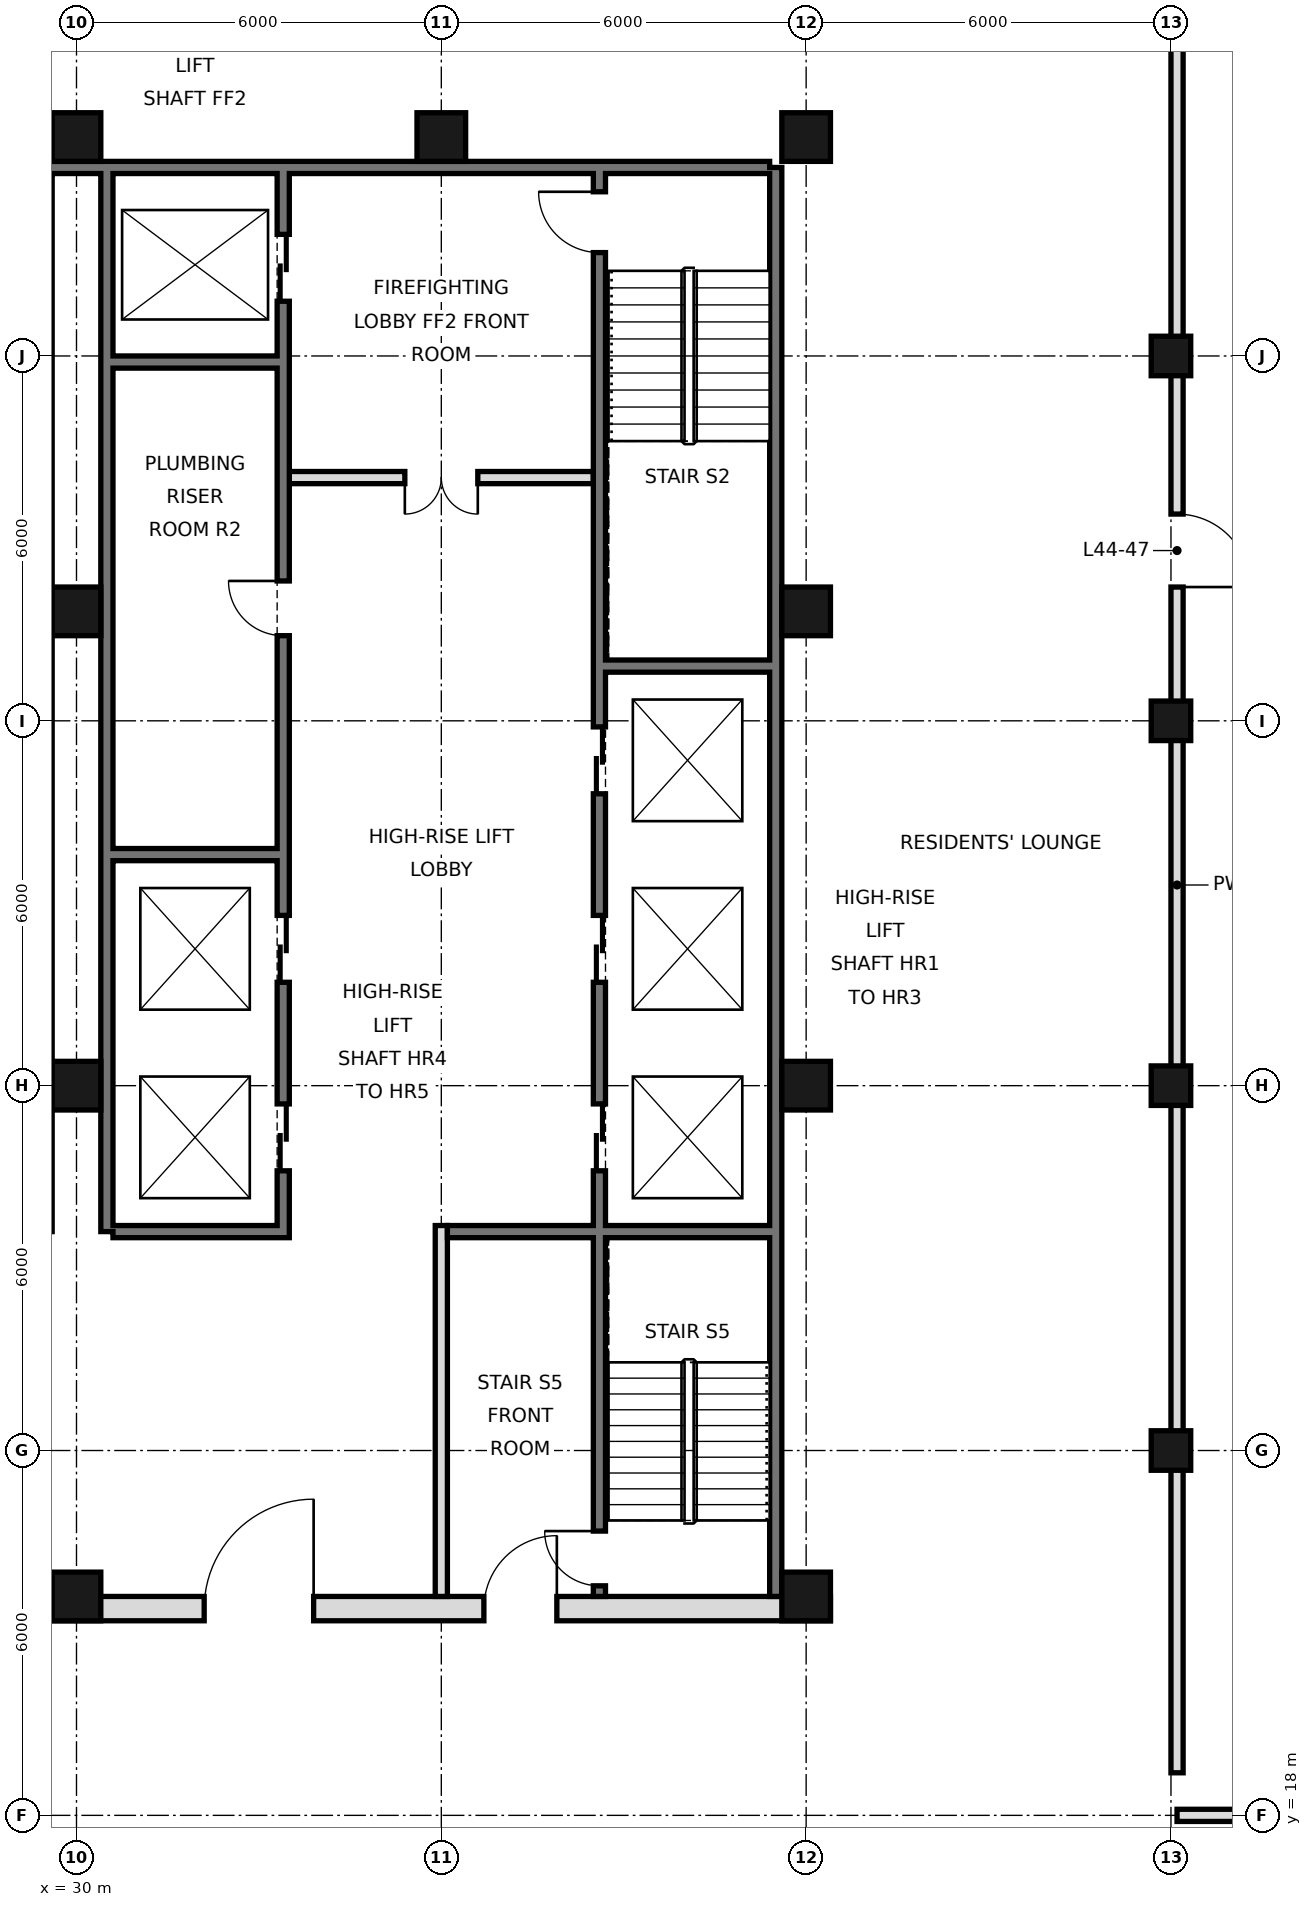
"""IFC4 building model, lengths in metres.
Left out: names, types, materials, properties, quantities, classifications, styles, units other than length and angle.
Written with IfcOpenShell. Run it as: python <this file> out.ifc"""

import sys

from ifc_helpers import new_model, si_unit, direction, frame, frame_2d, origin, origin_2d, place, context, subcontext, project, spatial, rectangle, hollow_rectangle, extrude, element, fill, save


model = new_model("IFC4")
c1 = context("Model", 3, precision=1e-05, world=origin(), true_north=direction((0.0, 1.0)))
c2 = subcontext(c1, "Body", "Model", "MODEL_VIEW")
j1 = project(units=[si_unit("LENGTHUNIT", "METRE"), si_unit("PLANEANGLEUNIT", "RADIAN")], contexts=[c1])
p1 = place(None, origin())
s1 = spatial("IfcSite", under=j1, at=p1, CompositionType="ELEMENT")
p2 = place(p1, origin())
s2 = spatial("IfcBuilding", under=s1, at=p2, CompositionType="ELEMENT")
p3 = place(p2, frame((0.0, 0.0, 192.0)))
s3 = spatial("IfcBuildingStorey", under=s2, at=p3, CompositionType="ELEMENT", Elevation=192.0)
for number, where, z_axis, x_axis in (
    (1, (30.0, 21.6, 0.0), (0.0, 0.0, 1.0), (1.0, 0.0, 0.0)),
    (2, (30.0, 30.0, 0.0), (0.0, 0.0, 1.0), (1.0, 0.0, 0.0)),
    (3, (30.0, 37.8, 0.0), (0.0, 0.0, 1.0), (1.0, 0.0, 0.0)),
    (4, (30.0, 45.6, 0.0), (0.0, 0.0, 1.0), (1.0, 0.0, 0.0)),
    (5, (36.0, 45.6, 0.0), (0.0, 0.0, 1.0), (1.0, 0.0, 0.0)),
    (6, (42.0, 21.6, 0.0), (0.0, 0.0, 1.0), (1.0, 0.0, 0.0)),
    (7, (42.0, 30.0, 0.0), (0.0, 0.0, 1.0), (1.0, 0.0, 0.0)),
    (8, (42.0, 37.8, 0.0), (0.0, 0.0, 1.0), (1.0, 0.0, 0.0)),
    (9, (42.0, 45.6, 0.0), (0.0, 0.0, 1.0), (1.0, 0.0, 0.0)),
):
    element("IfcColumn", number, at=place(p3, frame(where, z_axis=z_axis, x_axis=x_axis)), inside=s3, PredefinedType="COLUMN", context=c2, shape_type="SweptSolid", body=[
        extrude(hollow_rectangle(XDim=0.8, YDim=0.8, WallThickness=0.045, at=origin_2d()), origin(), (0.0, 0.0, 1.0), 3.6),
    ])
for number, where, z_axis, x_axis in (
    (10, (48.0, 24.0, 0.0), (0.0, 0.0, 1.0), (1.0, 0.0, 0.0)),
    (11, (48.0, 30.0, 0.0), (0.0, 0.0, 1.0), (1.0, 0.0, 0.0)),
    (12, (48.0, 36.0, 0.0), (0.0, 0.0, 1.0), (1.0, 0.0, 0.0)),
    (13, (48.0, 42.0, 0.0), (0.0, 0.0, 1.0), (1.0, 0.0, 0.0)),
):
    element("IfcColumn", number, at=place(p3, frame(where, z_axis=z_axis, x_axis=x_axis)), inside=s3, PredefinedType="COLUMN", context=c2, shape_type="SweptSolid", body=[
        extrude(hollow_rectangle(XDim=0.65, YDim=0.65, WallThickness=0.032, at=origin_2d()), origin(), (0.0, 0.0, 1.0), 3.6),
    ])
p4 = place(p3, frame((48.1, 18.7, 0.0), z_axis=(0.0, 0.0, 1.0), x_axis=(0.0, 1.0, 0.0)))
e14 = element("IfcWall", 14, at=p4, inside=s3, PredefinedType="SOLIDWALL", context=c2, shape_type="SweptSolid", body=[
    extrude(rectangle(XDim=29.2, YDim=0.2, at=frame_2d((14.6, 0.0))), origin(), (0.0, 0.0, 1.0), 2.72),
])
p5 = place(p4, frame((19.5, 0.0, 0.0)))
e15 = element("IfcOpeningElement", 15, at=p5, cuts=e14, PredefinedType="OPENING", context=c2, shape_type="SweptSolid", body=[
    extrude(rectangle(XDim=1.2, YDim=2.4, at=frame_2d((0.6, 1.2))), frame((0.0, 0.11, 0.0), z_axis=(0.0, -1.0, 0.0), x_axis=(1.0, 0.0, 0.0)), (0.0, 0.0, 1.0), 0.22),
])
p6 = place(p3, frame((48.1, 18.0, 0.0), z_axis=(0.0, 0.0, 1.0), x_axis=(1.0, 0.0, 0.0)))
e16 = element("IfcWall", 16, at=p6, inside=s3, PredefinedType="SOLIDWALL", context=c2, shape_type="SweptSolid", body=[
    extrude(rectangle(XDim=6.5, YDim=0.2, at=frame_2d((3.25, 0.0))), origin(), (0.0, 0.0, 1.0), 2.72),
])
p7 = place(p3, frame((41.5, 21.6, 0.0), z_axis=(0.0, 0.0, 1.0), x_axis=(0.0, 1.0, 0.0)))
e17 = element("IfcWall", 17, at=p7, inside=s3, PredefinedType="SOLIDWALL", context=c2, shape_type="SweptSolid", body=[
    extrude(rectangle(XDim=23.5, YDim=0.2, at=frame_2d((11.75, 0.0))), origin(), (0.0, 0.0, 1.0), 3.42),
])
p8 = place(p3, frame((6.6, 45.1, 0.0), z_axis=(0.0, 0.0, 1.0), x_axis=(1.0, 0.0, 0.0)))
e18 = element("IfcWall", 18, at=p8, inside=s3, PredefinedType="SOLIDWALL", context=c2, shape_type="SweptSolid", body=[
    extrude(rectangle(XDim=34.8, YDim=0.2, at=frame_2d((17.4, 0.0))), origin(), (0.0, 0.0, 1.0), 3.42),
])
p9 = place(p3, frame((30.5, 27.6, 0.0), z_axis=(0.0, 0.0, 1.0), x_axis=(0.0, 1.0, 0.0)))
e19 = element("IfcWall", 19, at=p9, inside=s3, PredefinedType="SOLIDWALL", context=c2, shape_type="SweptSolid", body=[
    extrude(rectangle(XDim=17.5, YDim=0.2, at=frame_2d((8.75, 0.0))), origin(), (0.0, 0.0, 1.0), 3.42),
])
p10 = place(p3, frame((5.6, 21.4, 0.0), z_axis=(0.0, 0.0, 1.0), x_axis=(1.0, 0.0, 0.0)))
e20 = element("IfcWall", 20, at=p10, inside=s3, PredefinedType="SOLIDWALL", context=c2, shape_type="SweptSolid", body=[
    extrude(rectangle(XDim=36.8, YDim=0.4, at=frame_2d((18.4, 0.0))), origin(), (0.0, 0.0, 1.0), 3.42),
])
p11 = place(p10, frame((8.5, 0.0, 0.0)))
e21 = element("IfcOpeningElement", 21, at=p11, cuts=e20, PredefinedType="OPENING", context=c2, shape_type="SweptSolid", body=[
    extrude(rectangle(XDim=1.8, YDim=2.1, at=frame_2d((0.9, 1.05))), frame((0.0, 0.21, 0.0), z_axis=(0.0, -1.0, 0.0), x_axis=(1.0, 0.0, 0.0)), (0.0, 0.0, 1.0), 0.42),
])
p12 = place(p10, frame((17.5, 0.0, 0.0)))
e22 = element("IfcOpeningElement", 22, at=p12, cuts=e20, PredefinedType="OPENING", context=c2, shape_type="SweptSolid", body=[
    extrude(rectangle(XDim=1.8, YDim=2.1, at=frame_2d((0.9, 1.05))), frame((0.0, 0.21, 0.0), z_axis=(0.0, -1.0, 0.0), x_axis=(1.0, 0.0, 0.0)), (0.0, 0.0, 1.0), 0.42),
])
p13 = place(p10, frame((26.5, 0.0, 0.0)))
e23 = element("IfcOpeningElement", 23, at=p13, cuts=e20, PredefinedType="OPENING", context=c2, shape_type="SweptSolid", body=[
    extrude(rectangle(XDim=1.8, YDim=2.1, at=frame_2d((0.9, 1.05))), frame((0.0, 0.21, 0.0), z_axis=(0.0, -1.0, 0.0), x_axis=(1.0, 0.0, 0.0)), (0.0, 0.0, 1.0), 0.42),
])
p14 = place(p10, frame((4.5, 0.0, 0.0)))
e24 = element("IfcOpeningElement", 24, at=p14, cuts=e20, PredefinedType="OPENING", context=c2, shape_type="SweptSolid", body=[
    extrude(rectangle(XDim=1.2, YDim=2.1, at=frame_2d((0.6, 1.05))), frame((0.0, 0.21, 0.0), z_axis=(0.0, -1.0, 0.0), x_axis=(1.0, 0.0, 0.0)), (0.0, 0.0, 1.0), 0.42),
])
p15 = place(p10, frame((31.1, 0.0, 0.0)))
e25 = element("IfcOpeningElement", 25, at=p15, cuts=e20, PredefinedType="OPENING", context=c2, shape_type="SweptSolid", body=[
    extrude(rectangle(XDim=1.2, YDim=2.1, at=frame_2d((0.6, 1.05))), frame((0.0, 0.21, 0.0), z_axis=(0.0, -1.0, 0.0), x_axis=(1.0, 0.0, 0.0)), (0.0, 0.0, 1.0), 0.42),
])
p16 = place(p3, frame((33.4, 27.5, 0.0), z_axis=(0.0, 0.0, 1.0), x_axis=(0.0, 1.0, 0.0)))
e26 = element("IfcWall", 26, at=p16, inside=s3, PredefinedType="SOLIDWALL", context=c2, shape_type="SweptSolid", body=[
    extrude(rectangle(XDim=17.5, YDim=0.2, at=frame_2d((8.75, 0.0))), origin(), (0.0, 0.0, 1.0), 3.42),
])
p17 = place(p16, frame((1.1, 0.0, 0.0)))
e27 = element("IfcOpeningElement", 27, at=p17, cuts=e26, PredefinedType="OPENING", context=c2, shape_type="SweptSolid", body=[
    extrude(rectangle(XDim=1.1, YDim=2.1, at=frame_2d((0.55, 1.05))), frame((0.0, 0.11, 0.0), z_axis=(0.0, -1.0, 0.0), x_axis=(1.0, 0.0, 0.0)), (0.0, 0.0, 1.0), 0.22),
])
p18 = place(p16, frame((4.2, 0.0, 0.0)))
e28 = element("IfcOpeningElement", 28, at=p18, cuts=e26, PredefinedType="OPENING", context=c2, shape_type="SweptSolid", body=[
    extrude(rectangle(XDim=1.1, YDim=2.1, at=frame_2d((0.55, 1.05))), frame((0.0, 0.11, 0.0), z_axis=(0.0, -1.0, 0.0), x_axis=(1.0, 0.0, 0.0)), (0.0, 0.0, 1.0), 0.22),
])
p19 = place(p16, frame((15.4, 0.0, 0.0)))
e29 = element("IfcOpeningElement", 29, at=p19, cuts=e26, PredefinedType="OPENING", context=c2, shape_type="SweptSolid", body=[
    extrude(rectangle(XDim=1.1, YDim=2.1, at=frame_2d((0.55, 1.05))), frame((0.0, 0.11, 0.0), z_axis=(0.0, -1.0, 0.0), x_axis=(1.0, 0.0, 0.0)), (0.0, 0.0, 1.0), 0.22),
])
p20 = place(p16, frame((9.9, 0.0, 0.0)))
e30 = element("IfcOpeningElement", 30, at=p20, cuts=e26, PredefinedType="OPENING", context=c2, shape_type="SweptSolid", body=[
    extrude(rectangle(XDim=0.9, YDim=2.1, at=frame_2d((0.45, 1.05))), frame((0.0, 0.11, 0.0), z_axis=(0.0, -1.0, 0.0), x_axis=(1.0, 0.0, 0.0)), (0.0, 0.0, 1.0), 0.22),
])
p21 = place(p3, frame((36.0, 21.6, 0.0), z_axis=(0.0, 0.0, 1.0), x_axis=(0.0, 1.0, 0.0)))
e31 = element("IfcWall", 31, at=p21, inside=s3, PredefinedType="PARTITIONING", context=c2, shape_type="SweptSolid", body=[
    extrude(rectangle(XDim=6.1, YDim=0.2, at=frame_2d((3.05, 0.0))), origin(), (0.0, 0.0, 1.0), 3.42),
])
p22 = place(p3, frame((38.6, 21.6, 0.0), z_axis=(0.0, 0.0, 1.0), x_axis=(0.0, 1.0, 0.0)))
e32 = element("IfcWall", 32, at=p22, inside=s3, PredefinedType="SOLIDWALL", context=c2, shape_type="SweptSolid", body=[
    extrude(rectangle(XDim=23.4, YDim=0.2, at=frame_2d((11.7, 0.0))), origin(), (0.0, 0.0, 1.0), 3.42),
])
p23 = place(p22, frame((7.0, 0.0, 0.0)))
e33 = element("IfcOpeningElement", 33, at=p23, cuts=e32, PredefinedType="OPENING", context=c2, shape_type="SweptSolid", body=[
    extrude(rectangle(XDim=1.1, YDim=2.1, at=frame_2d((0.55, 1.05))), frame((0.0, 0.11, 0.0), z_axis=(0.0, -1.0, 0.0), x_axis=(1.0, 0.0, 0.0)), (0.0, 0.0, 1.0), 0.22),
])
p24 = place(p22, frame((10.1, 0.0, 0.0)))
e34 = element("IfcOpeningElement", 34, at=p24, cuts=e32, PredefinedType="OPENING", context=c2, shape_type="SweptSolid", body=[
    extrude(rectangle(XDim=1.1, YDim=2.1, at=frame_2d((0.55, 1.05))), frame((0.0, 0.11, 0.0), z_axis=(0.0, -1.0, 0.0), x_axis=(1.0, 0.0, 0.0)), (0.0, 0.0, 1.0), 0.22),
])
p25 = place(p22, frame((13.2, 0.0, 0.0)))
e35 = element("IfcOpeningElement", 35, at=p25, cuts=e32, PredefinedType="OPENING", context=c2, shape_type="SweptSolid", body=[
    extrude(rectangle(XDim=1.1, YDim=2.1, at=frame_2d((0.55, 1.05))), frame((0.0, 0.11, 0.0), z_axis=(0.0, -1.0, 0.0), x_axis=(1.0, 0.0, 0.0)), (0.0, 0.0, 1.0), 0.22),
])
p26 = place(p22, frame((22.1, 0.0, 0.0)))
e36 = element("IfcOpeningElement", 36, at=p26, cuts=e32, PredefinedType="OPENING", context=c2, shape_type="SweptSolid", body=[
    extrude(rectangle(XDim=1.0, YDim=2.1, at=frame_2d((0.5, 1.05))), frame((0.0, 0.11, 0.0), z_axis=(0.0, -1.0, 0.0), x_axis=(1.0, 0.0, 0.0)), (0.0, 0.0, 1.0), 0.22),
])
p27 = place(p22, frame((0.175, 0.0, 0.0)))
e37 = element("IfcOpeningElement", 37, at=p27, cuts=e32, PredefinedType="OPENING", context=c2, shape_type="SweptSolid", body=[
    extrude(rectangle(XDim=0.9, YDim=2.1, at=frame_2d((0.45, 1.05))), frame((0.0, 0.11, 0.0), z_axis=(0.0, -1.0, 0.0), x_axis=(1.0, 0.0, 0.0)), (0.0, 0.0, 1.0), 0.22),
])
p28 = place(p3, frame((30.6, 27.6, 0.0), z_axis=(0.0, 0.0, 1.0), x_axis=(1.0, 0.0, 0.0)))
e38 = element("IfcWall", 38, at=p28, inside=s3, PredefinedType="SOLIDWALL", context=c2, shape_type="SweptSolid", body=[
    extrude(rectangle(XDim=2.7, YDim=0.2, at=frame_2d((1.35, 0.0))), origin(), (0.0, 0.0, 1.0), 3.42),
])
p29 = place(p3, frame((36.1, 27.6, 0.0), z_axis=(0.0, 0.0, 1.0), x_axis=(1.0, 0.0, 0.0)))
e39 = element("IfcWall", 39, at=p29, inside=s3, PredefinedType="SOLIDWALL", context=c2, shape_type="SweptSolid", body=[
    extrude(rectangle(XDim=5.3, YDim=0.2, at=frame_2d((2.65, 0.0))), origin(), (0.0, 0.0, 1.0), 3.42),
])
for number, where, z_axis, x_axis in (
    (40, (30.6, 33.8, 0.0), (0.0, 0.0, 1.0), (1.0, 0.0, 0.0)),
    (41, (38.7, 36.9, 0.0), (0.0, 0.0, 1.0), (1.0, 0.0, 0.0)),
):
    element("IfcWall", number, at=place(p3, frame(where, z_axis=z_axis, x_axis=x_axis)), inside=s3, PredefinedType="SOLIDWALL", context=c2, shape_type="SweptSolid", body=[
        extrude(rectangle(XDim=2.7, YDim=0.2, at=frame_2d((1.35, 0.0))), origin(), (0.0, 0.0, 1.0), 3.42),
    ])
p30 = place(p3, frame((33.5, 40.0, 0.0), z_axis=(0.0, 0.0, 1.0), x_axis=(1.0, 0.0, 0.0)))
e42 = element("IfcWall", 42, at=p30, inside=s3, PredefinedType="PARTITIONING", context=c2, shape_type="SweptSolid", body=[
    extrude(rectangle(XDim=5.0, YDim=0.2, at=frame_2d((2.5, 0.0))), origin(), (0.0, 0.0, 1.0), 3.42),
])
p31 = place(p30, frame((1.9, 0.0, 0.0)))
e43 = element("IfcOpeningElement", 43, at=p31, cuts=e42, PredefinedType="OPENING", context=c2, shape_type="SweptSolid", body=[
    extrude(rectangle(XDim=1.2, YDim=2.1, at=frame_2d((0.6, 1.05))), frame((0.0, 0.11, 0.0), z_axis=(0.0, -1.0, 0.0), x_axis=(1.0, 0.0, 0.0)), (0.0, 0.0, 1.0), 0.22),
])
p32 = place(p3, frame((30.6, 41.9, 0.0), z_axis=(0.0, 0.0, 1.0), x_axis=(1.0, 0.0, 0.0)))
e44 = element("IfcWall", 44, at=p32, inside=s3, PredefinedType="SOLIDWALL", context=c2, shape_type="SweptSolid", body=[
    extrude(rectangle(XDim=2.7, YDim=0.2, at=frame_2d((1.35, 0.0))), origin(), (0.0, 0.0, 1.0), 3.42),
])
p33 = place(p5, frame((1.2, 0.0, 0.0), z_axis=(0.0, 0.0, 1.0), x_axis=(-1.0, 0.0, 0.0)))
e45 = element("IfcDoor", 45, at=p33, inside=s3, OperationType="SINGLE_SWING_RIGHT", PredefinedType="DOOR", context=c2, shape_type="SweptSolid", body=[
    extrude(rectangle(XDim=1.2, YDim=2.4, at=frame_2d((0.6, 1.2))), frame((0.0, 0.025, 0.0), z_axis=(0.0, -1.0, 0.0), x_axis=(1.0, 0.0, 0.0)), (0.0, 0.0, 1.0), 0.05),
])
fill(e15, e45)
p34 = place(p13, frame((1.8, 0.0, 0.0), z_axis=(0.0, 0.0, 1.0), x_axis=(-1.0, 0.0, 0.0)))
e46 = element("IfcDoor", 46, at=p34, inside=s3, OperationType="SINGLE_SWING_LEFT", PredefinedType="DOOR", context=c2, shape_type="SweptSolid", body=[
    extrude(rectangle(XDim=1.8, YDim=2.1, at=frame_2d((0.9, 1.05))), frame((0.0, 0.025, 0.0), z_axis=(0.0, -1.0, 0.0), x_axis=(1.0, 0.0, 0.0)), (0.0, 0.0, 1.0), 0.05),
])
fill(e23, e46)
p35 = place(p15, frame((1.2, 0.0, 0.0), z_axis=(0.0, 0.0, 1.0), x_axis=(-1.0, 0.0, 0.0)))
e47 = element("IfcDoor", 47, at=p35, inside=s3, OperationType="SINGLE_SWING_LEFT", PredefinedType="DOOR", context=c2, shape_type="SweptSolid", body=[
    extrude(rectangle(XDim=1.2, YDim=2.1, at=frame_2d((0.6, 1.05))), frame((0.0, 0.025, 0.0), z_axis=(0.0, -1.0, 0.0), x_axis=(1.0, 0.0, 0.0)), (0.0, 0.0, 1.0), 0.05),
])
fill(e25, e47)
p36 = place(p31, frame((1.2, 0.0, 0.0), z_axis=(0.0, 0.0, 1.0), x_axis=(-1.0, 0.0, 0.0)))
e48 = element("IfcDoor", 48, at=p36, inside=s3, OperationType="DOUBLE_DOOR_SINGLE_SWING", PredefinedType="DOOR", context=c2, shape_type="SweptSolid", body=[
    extrude(rectangle(XDim=1.2, YDim=2.1, at=frame_2d((0.6, 1.05))), frame((0.0, 0.025, 0.0), z_axis=(0.0, -1.0, 0.0), x_axis=(1.0, 0.0, 0.0)), (0.0, 0.0, 1.0), 0.05),
])
fill(e43, e48)
p37 = place(p23, origin())
e49 = element("IfcDoor", 49, at=p37, inside=s3, OperationType="DOUBLE_DOOR_SLIDING", PredefinedType="DOOR", context=c2, shape_type="SweptSolid", body=[
    extrude(rectangle(XDim=1.1, YDim=2.1, at=frame_2d((0.55, 1.05))), frame((0.0, 0.025, 0.0), z_axis=(0.0, -1.0, 0.0), x_axis=(1.0, 0.0, 0.0)), (0.0, 0.0, 1.0), 0.05),
])
fill(e33, e49)
p38 = place(p24, origin())
e50 = element("IfcDoor", 50, at=p38, inside=s3, OperationType="DOUBLE_DOOR_SLIDING", PredefinedType="DOOR", context=c2, shape_type="SweptSolid", body=[
    extrude(rectangle(XDim=1.1, YDim=2.1, at=frame_2d((0.55, 1.05))), frame((0.0, 0.025, 0.0), z_axis=(0.0, -1.0, 0.0), x_axis=(1.0, 0.0, 0.0)), (0.0, 0.0, 1.0), 0.05),
])
fill(e34, e50)
p39 = place(p25, origin())
e51 = element("IfcDoor", 51, at=p39, inside=s3, OperationType="DOUBLE_DOOR_SLIDING", PredefinedType="DOOR", context=c2, shape_type="SweptSolid", body=[
    extrude(rectangle(XDim=1.1, YDim=2.1, at=frame_2d((0.55, 1.05))), frame((0.0, 0.025, 0.0), z_axis=(0.0, -1.0, 0.0), x_axis=(1.0, 0.0, 0.0)), (0.0, 0.0, 1.0), 0.05),
])
fill(e35, e51)
p40 = place(p17, origin())
e52 = element("IfcDoor", 52, at=p40, inside=s3, OperationType="DOUBLE_DOOR_SLIDING", PredefinedType="DOOR", context=c2, shape_type="SweptSolid", body=[
    extrude(rectangle(XDim=1.1, YDim=2.1, at=frame_2d((0.55, 1.05))), frame((0.0, 0.025, 0.0), z_axis=(0.0, -1.0, 0.0), x_axis=(1.0, 0.0, 0.0)), (0.0, 0.0, 1.0), 0.05),
])
fill(e27, e52)
p41 = place(p18, origin())
e53 = element("IfcDoor", 53, at=p41, inside=s3, OperationType="DOUBLE_DOOR_SLIDING", PredefinedType="DOOR", context=c2, shape_type="SweptSolid", body=[
    extrude(rectangle(XDim=1.1, YDim=2.1, at=frame_2d((0.55, 1.05))), frame((0.0, 0.025, 0.0), z_axis=(0.0, -1.0, 0.0), x_axis=(1.0, 0.0, 0.0)), (0.0, 0.0, 1.0), 0.05),
])
fill(e28, e53)
p42 = place(p19, origin())
e54 = element("IfcDoor", 54, at=p42, inside=s3, OperationType="DOUBLE_DOOR_SLIDING", PredefinedType="DOOR", context=c2, shape_type="SweptSolid", body=[
    extrude(rectangle(XDim=1.1, YDim=2.1, at=frame_2d((0.55, 1.05))), frame((0.0, 0.025, 0.0), z_axis=(0.0, -1.0, 0.0), x_axis=(1.0, 0.0, 0.0)), (0.0, 0.0, 1.0), 0.05),
])
fill(e29, e54)
p43 = place(p26, frame((1.0, 0.0, 0.0), z_axis=(0.0, 0.0, 1.0), x_axis=(-1.0, 0.0, 0.0)))
e55 = element("IfcDoor", 55, at=p43, inside=s3, OperationType="SINGLE_SWING_LEFT", PredefinedType="DOOR", context=c2, shape_type="SweptSolid", body=[
    extrude(rectangle(XDim=1.0, YDim=2.1, at=frame_2d((0.5, 1.05))), frame((0.0, 0.025, 0.0), z_axis=(0.0, -1.0, 0.0), x_axis=(1.0, 0.0, 0.0)), (0.0, 0.0, 1.0), 0.05),
])
fill(e36, e55)
p44 = place(p27, frame((0.9, 0.0, 0.0), z_axis=(0.0, 0.0, 1.0), x_axis=(-1.0, 0.0, 0.0)))
e56 = element("IfcDoor", 56, at=p44, inside=s3, OperationType="SINGLE_SWING_LEFT", PredefinedType="DOOR", context=c2, shape_type="SweptSolid", body=[
    extrude(rectangle(XDim=0.9, YDim=2.1, at=frame_2d((0.45, 1.05))), frame((0.0, 0.025, 0.0), z_axis=(0.0, -1.0, 0.0), x_axis=(1.0, 0.0, 0.0)), (0.0, 0.0, 1.0), 0.05),
])
fill(e37, e56)
p45 = place(p20, frame((0.9, 0.0, 0.0), z_axis=(0.0, 0.0, 1.0), x_axis=(-1.0, 0.0, 0.0)))
e57 = element("IfcDoor", 57, at=p45, inside=s3, OperationType="SINGLE_SWING_LEFT", PredefinedType="DOOR", context=c2, shape_type="SweptSolid", body=[
    extrude(rectangle(XDim=0.9, YDim=2.1, at=frame_2d((0.45, 1.05))), frame((0.0, 0.025, 0.0), z_axis=(0.0, -1.0, 0.0), x_axis=(1.0, 0.0, 0.0)), (0.0, 0.0, 1.0), 0.05),
])
fill(e30, e57)
save(model, sys.argv[1])
